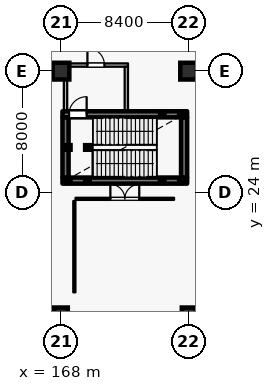
"""IFC4 building model, lengths in metres.
Left out: names, types, materials, properties, quantities, classifications, styles, units other than length and angle.
Written with IfcOpenShell. Run it as: python <this file> out.ifc"""

import sys

from ifc_helpers import new_model, si_unit, direction, frame, frame_2d, origin, origin_2d, place, context, subcontext, project, spatial, rectangle, hollow_rectangle, circle, extrude, element, fill, save


model = new_model("IFC4")
c1 = context("Model", 3, precision=1e-05, world=origin(), true_north=direction((0.0, 1.0)))
c2 = subcontext(c1, "Body", "Model", "MODEL_VIEW")
j1 = project(units=[si_unit("LENGTHUNIT", "METRE"), si_unit("PLANEANGLEUNIT", "RADIAN")], contexts=[c1])
p1 = place(None, origin())
s1 = spatial("IfcSite", under=j1, at=p1, CompositionType="ELEMENT")
p2 = place(p1, origin())
s2 = spatial("IfcBuilding", under=s1, at=p2, CompositionType="ELEMENT")
p3 = place(p2, frame((0.0, 0.0, 6.0)))
s3 = spatial("IfcBuildingStorey", under=s2, at=p3, CompositionType="ELEMENT", Elevation=6.0)
p4 = place(p3, frame((168.0, 16.0, 0.0), z_axis=(0.0, 0.0, 1.0), x_axis=(1.0, 0.0, 0.0)))
e1 = element("IfcColumn", 1, at=p4, inside=s3, PredefinedType="COLUMN", context=c2, shape_type="SweptSolid", body=[
    extrude(circle(Radius=0.45, at=origin_2d()), origin(), (0.0, 0.0, 1.0), 5.4),
])
p5 = place(p3, frame((168.0, 32.0, 0.0), z_axis=(0.0, 0.0, 1.0), x_axis=(1.0, 0.0, 0.0)))
e2 = element("IfcColumn", 2, at=p5, inside=s3, PredefinedType="COLUMN", context=c2, shape_type="SweptSolid", body=[
    extrude(circle(Radius=0.55, at=origin_2d()), origin(), (0.0, 0.0, 1.0), 5.4),
])
p6 = place(p3, frame((176.4, 16.0, 0.0), z_axis=(0.0, 0.0, 1.0), x_axis=(1.0, 0.0, 0.0)))
e3 = element("IfcColumn", 3, at=p6, inside=s3, PredefinedType="COLUMN", context=c2, shape_type="SweptSolid", body=[
    extrude(circle(Radius=0.45, at=origin_2d()), origin(), (0.0, 0.0, 1.0), 5.4),
])
p7 = place(p3, frame((176.4, 32.0, 0.0), z_axis=(0.0, 0.0, 1.0), x_axis=(1.0, 0.0, 0.0)))
e4 = element("IfcColumn", 4, at=p7, inside=s3, PredefinedType="COLUMN", context=c2, shape_type="SweptSolid", body=[
    extrude(circle(Radius=0.55, at=origin_2d()), origin(), (0.0, 0.0, 1.0), 5.4),
])
p8 = place(p3, frame((168.1, 24.8, 0.0), z_axis=(0.0, 0.0, 1.0), x_axis=(1.0, 0.0, 0.0)))
e5 = element("IfcWall", 5, at=p8, inside=s3, PredefinedType="SHEAR", context=c2, shape_type="SweptSolid", body=[
    extrude(rectangle(XDim=8.2, YDim=0.4, at=frame_2d((4.1, 0.0))), origin(), (0.0, 0.0, 1.0), 5.045),
])
p9 = place(p3, frame((176.1, 25.005, 0.0), z_axis=(0.0, 0.0, 1.0), x_axis=(0.0, 1.0, 0.0)))
e6 = element("IfcWall", 6, at=p9, inside=s3, PredefinedType="SHEAR", context=c2, shape_type="SweptSolid", body=[
    extrude(rectangle(XDim=3.95, YDim=0.4, at=frame_2d((1.975, 0.0))), origin(), (0.0, 0.0, 1.0), 5.045),
])
p10 = place(p3, frame((168.1, 29.16, 0.0), z_axis=(0.0, 0.0, 1.0), x_axis=(1.0, 0.0, 0.0)))
e7 = element("IfcWall", 7, at=p10, inside=s3, PredefinedType="SHEAR", context=c2, shape_type="SweptSolid", body=[
    extrude(rectangle(XDim=8.2, YDim=0.4, at=frame_2d((4.1, 0.0))), origin(), (0.0, 0.0, 1.0), 5.045),
])
p11 = place(p10, frame((0.43, 0.0, 0.0)))
e8 = element("IfcOpeningElement", 8, at=p11, cuts=e7, PredefinedType="OPENING", context=c2, shape_type="SweptSolid", body=[
    extrude(rectangle(XDim=1.16, YDim=2.2, at=frame_2d((0.58, 1.1))), frame((0.0, 0.21, 0.0), z_axis=(0.0, -1.0, 0.0), x_axis=(1.0, 0.0, 0.0)), (0.0, 0.0, 1.0), 0.42),
])
p12 = place(p3, frame((168.3, 25.005, 0.0), z_axis=(0.0, 0.0, 1.0), x_axis=(0.0, 1.0, 0.0)))
e9 = element("IfcWall", 9, at=p12, inside=s3, PredefinedType="SHEAR", context=c2, shape_type="SweptSolid", body=[
    extrude(rectangle(XDim=3.95, YDim=0.4, at=frame_2d((1.975, 0.0))), origin(), (0.0, 0.0, 1.0), 5.045),
])
p13 = place(p3, frame((168.3, 29.365, 0.0), z_axis=(0.0, 0.0, 1.0), x_axis=(0.0, 1.0, 0.0)))
e10 = element("IfcWall", 10, at=p13, inside=s3, PredefinedType="PARTITIONING", context=c2, shape_type="SweptSolid", body=[
    extrude(rectangle(XDim=2.92, YDim=0.22, at=frame_2d((1.46, 0.0))), origin(), (0.0, 0.0, 1.0), 3.45),
])
p14 = place(p3, frame((168.19, 32.4, 0.0), z_axis=(0.0, 0.0, 1.0), x_axis=(1.0, 0.0, 0.0)))
e11 = element("IfcWall", 11, at=p14, inside=s3, PredefinedType="PARTITIONING", context=c2, shape_type="SweptSolid", body=[
    extrude(rectangle(XDim=4.22, YDim=0.22, at=frame_2d((2.11, 0.0))), origin(), (0.0, 0.0, 1.0), 5.045),
])
p15 = place(p14, frame((1.55, 0.0, 0.0)))
e12 = element("IfcOpeningElement", 12, at=p15, cuts=e11, PredefinedType="OPENING", context=c2, shape_type="SweptSolid", body=[
    extrude(rectangle(XDim=1.12, YDim=2.2, at=frame_2d((0.56, 1.1))), frame((0.0, 0.12, 0.0), z_axis=(0.0, -1.0, 0.0), x_axis=(1.0, 0.0, 0.0)), (0.0, 0.0, 1.0), 0.24),
])
p16 = place(p3, frame((172.3, 29.365, 0.0), z_axis=(0.0, 0.0, 1.0), x_axis=(0.0, 1.0, 0.0)))
e13 = element("IfcWall", 13, at=p16, inside=s3, PredefinedType="PARTITIONING", context=c2, shape_type="SweptSolid", body=[
    extrude(rectangle(XDim=2.92, YDim=0.22, at=frame_2d((1.46, 0.0))), origin(), (0.0, 0.0, 1.0), 5.045),
])
for number, where, z_axis, x_axis in (
    (14, (168.48, 24.8, 0.0), (0.0, 0.0, 1.0), (1.0, 0.0, 0.0)),
    (15, (168.48, 26.98, 0.0), (0.0, 0.0, 1.0), (1.0, 0.0, 0.0)),
    (16, (169.74, 24.8, 0.0), (0.0, 0.0, 1.0), (1.0, 0.0, 0.0)),
    (17, (169.74, 26.98, 0.0), (0.0, 0.0, 1.0), (1.0, 0.0, 0.0)),
):
    element("IfcColumn", number, at=place(p3, frame(where, z_axis=z_axis, x_axis=x_axis)), inside=s3, PredefinedType="COLUMN", context=c2, shape_type="SweptSolid", body=[
        extrude(hollow_rectangle(XDim=0.3, YDim=0.3, WallThickness=0.012, at=origin_2d()), origin(), (0.0, 0.0, 1.0), 5.22),
    ])
for number, where, z_axis, x_axis in (
    (18, (174.66, 24.8, -3.0), (0.0, 0.0, 1.0), (1.0, 0.0, 0.0)),
    (19, (174.66, 29.16, -3.0), (0.0, 0.0, 1.0), (1.0, 0.0, 0.0)),
    (20, (175.92, 24.8, -3.0), (0.0, 0.0, 1.0), (1.0, 0.0, 0.0)),
    (21, (175.92, 29.16, -3.0), (0.0, 0.0, 1.0), (1.0, 0.0, 0.0)),
):
    element("IfcColumn", number, at=place(p3, frame(where, z_axis=z_axis, x_axis=x_axis)), inside=s3, PredefinedType="COLUMN", context=c2, shape_type="SweptSolid", body=[
        extrude(hollow_rectangle(XDim=0.3, YDim=0.3, WallThickness=0.012, at=origin_2d()), origin(), (0.0, 0.0, 1.0), 5.52),
    ])
p17 = place(p3, frame((168.96, 23.6, 0.0), z_axis=(0.0, 0.0, 1.0), x_axis=(1.0, 0.0, 0.0)))
e22 = element("IfcWall", 22, at=p17, inside=s3, PredefinedType="PARTITIONING", context=c2, shape_type="SweptSolid", body=[
    extrude(rectangle(XDim=6.48, YDim=0.14, at=frame_2d((3.24, 0.0))), origin(), (0.0, 0.0, 1.0), 5.045),
])
p18 = place(p17, frame((2.29, 0.0, 0.0)))
e23 = element("IfcOpeningElement", 23, at=p18, cuts=e22, PredefinedType="OPENING", context=c2, shape_type="SweptSolid", body=[
    extrude(rectangle(XDim=1.9, YDim=2.4, at=frame_2d((0.95, 1.2))), frame((0.0, 0.08, 0.0), z_axis=(0.0, -1.0, 0.0), x_axis=(1.0, 0.0, 0.0)), (0.0, 0.0, 1.0), 0.16),
])
p19 = place(p3, frame((168.88, 17.45, 0.0), z_axis=(0.0, 0.0, 1.0), x_axis=(0.0, 1.0, 0.0)))
e24 = element("IfcWall", 24, at=p19, inside=s3, PredefinedType="PARTITIONING", context=c2, shape_type="SweptSolid", body=[
    extrude(rectangle(XDim=6.01, YDim=0.14, at=frame_2d((3.005, 0.0))), origin(), (0.0, 0.0, 1.0), 5.045),
])
p20 = place(p11, origin())
e25 = element("IfcDoor", 25, at=p20, inside=s3, OperationType="SINGLE_SWING_RIGHT", PredefinedType="DOOR", context=c2, shape_type="SweptSolid", body=[
    extrude(rectangle(XDim=1.16, YDim=2.2, at=frame_2d((0.58, 1.1))), frame((0.0, 0.025, 0.0), z_axis=(0.0, -1.0, 0.0), x_axis=(1.0, 0.0, 0.0)), (0.0, 0.0, 1.0), 0.05),
])
fill(e8, e25)
p21 = place(p15, origin())
e26 = element("IfcDoor", 26, at=p21, inside=s3, OperationType="SINGLE_SWING_LEFT", PredefinedType="DOOR", context=c2, shape_type="SweptSolid", body=[
    extrude(rectangle(XDim=1.12, YDim=2.2, at=frame_2d((0.56, 1.1))), frame((0.0, 0.025, 0.0), z_axis=(0.0, -1.0, 0.0), x_axis=(1.0, 0.0, 0.0)), (0.0, 0.0, 1.0), 0.05),
])
fill(e12, e26)
p22 = place(p18, origin())
e27 = element("IfcDoor", 27, at=p22, inside=s3, OperationType="DOUBLE_DOOR_SINGLE_SWING", PredefinedType="DOOR", context=c2, shape_type="SweptSolid", body=[
    extrude(rectangle(XDim=1.9, YDim=2.4, at=frame_2d((0.95, 1.2))), frame((0.0, 0.025, 0.0), z_axis=(0.0, -1.0, 0.0), x_axis=(1.0, 0.0, 0.0)), (0.0, 0.0, 1.0), 0.05),
])
fill(e23, e27)
save(model, sys.argv[1])
